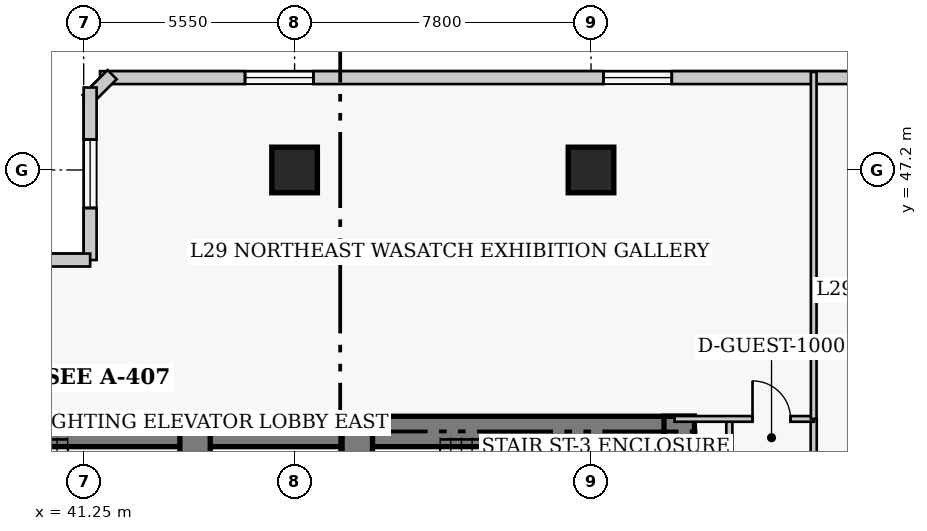
"""IFC4 building model, lengths in metres.
Left out: names, types, materials, properties, quantities, classifications, styles, units other than length and angle.
Written with IfcOpenShell. Run it as: python <this file> out.ifc"""

import sys

from ifc_helpers import new_model, si_unit, direction, frame, frame_2d, origin, origin_2d, place, context, subcontext, project, spatial, rectangle, extrude, element, fill, save


model = new_model("IFC4")
c1 = context("Model", 3, precision=1e-05, world=origin(), true_north=direction((0.0, 1.0)))
c2 = subcontext(c1, "Body", "Model", "MODEL_VIEW")
j1 = project(units=[si_unit("LENGTHUNIT", "METRE"), si_unit("PLANEANGLEUNIT", "RADIAN")], contexts=[c1])
p1 = place(None, origin())
s1 = spatial("IfcSite", under=j1, at=p1, CompositionType="ELEMENT")
p2 = place(p1, origin())
s2 = spatial("IfcBuilding", under=s1, at=p2, CompositionType="ELEMENT")
p3 = place(p2, frame((0.0, 0.0, 118.4)))
s3 = spatial("IfcBuildingStorey", under=s2, at=p3, CompositionType="ELEMENT", Elevation=118.4)
p4 = place(p3, frame((35.85, 40.32, 0.0), z_axis=(0.0, 0.0, 1.0), x_axis=(1.0, 0.0, 0.0)))
e1 = element("IfcWall", 1, at=p4, inside=s3, PredefinedType="SHEAR", context=c2, shape_type="SweptSolid", body=[
    extrude(rectangle(XDim=12.6, YDim=0.8, at=frame_2d((6.3, 0.0))), origin(), (0.0, 0.0, 1.0), 3.8),
])
p5 = place(p3, frame((48.45, 40.32, 0.0), z_axis=(0.0, 0.0, 1.0), x_axis=(1.0, 0.0, 0.0)))
e2 = element("IfcWall", 2, at=p5, inside=s3, PredefinedType="SHEAR", context=c2, shape_type="SweptSolid", body=[
    extrude(rectangle(XDim=8.87, YDim=0.8, at=frame_2d((4.435, 0.0))), origin(), (0.0, 0.0, 1.0), 3.8),
])
p6 = place(p3, frame((56.92, 27.05, 0.0), z_axis=(0.0, 0.0, 1.0), x_axis=(0.0, 1.0, 0.0)))
e3 = element("IfcWall", 3, at=p6, inside=s3, PredefinedType="SHEAR", context=c2, shape_type="SweptSolid", body=[
    extrude(rectangle(XDim=13.67, YDim=0.8, at=frame_2d((6.835, 0.0))), origin(), (0.0, 0.0, 1.0), 3.8),
])
p7 = place(p3, frame((44.18, 36.37, 0.0), z_axis=(0.0, 0.0, 1.0), x_axis=(0.0, 1.0, 0.0)))
e4 = element("IfcWall", 4, at=p7, inside=s3, PredefinedType="SHEAR", context=c2, shape_type="SweptSolid", body=[
    extrude(rectangle(XDim=3.95, YDim=0.8, at=frame_2d((1.975, 0.0))), origin(), (0.0, 0.0, 1.0), 3.8),
])
p8 = place(p3, frame((48.45, 32.35, 0.0), z_axis=(0.0, 0.0, 1.0), x_axis=(0.0, 1.0, 0.0)))
e5 = element("IfcWall", 5, at=p8, inside=s3, PredefinedType="SHEAR", context=c2, shape_type="SweptSolid", body=[
    extrude(rectangle(XDim=7.97, YDim=0.8, at=frame_2d((3.985, 0.0))), origin(), (0.0, 0.0, 1.0), 3.8),
])
p9 = place(p8, frame((5.85, 0.0, 0.0)))
e6 = element("IfcOpeningElement", 6, at=p9, cuts=e5, PredefinedType="OPENING", context=c2, shape_type="SweptSolid", body=[
    extrude(rectangle(XDim=1.1, YDim=2.15, at=frame_2d((0.55, 1.075))), frame((0.0, 0.41, 0.0), z_axis=(0.0, -1.0, 0.0), x_axis=(1.0, 0.0, 0.0)), (0.0, 0.0, 1.0), 0.82),
])
for number, where, z_axis, x_axis in (
    (7, (46.8, 47.2, 0.0), (0.0, 0.0, 1.0), (1.0, 0.0, 0.0)),
    (8, (54.6, 47.2, 0.0), (0.0, 0.0, 1.0), (1.0, 0.0, 0.0)),
):
    element("IfcColumn", number, at=place(p3, frame(where, z_axis=z_axis, x_axis=x_axis)), inside=s3, PredefinedType="COLUMN", context=c2, shape_type="SweptSolid", body=[
        extrude(rectangle(XDim=1.2, YDim=1.2, at=origin_2d()), origin(), (0.0, 0.0, 1.0), 3.8),
    ])
p10 = place(p3, frame((69.97, 49.63, 0.0), z_axis=(0.0, 0.0, 1.0), x_axis=(-1.0, 0.0, 0.0)))
e9 = element("IfcWall", 9, at=p10, inside=s3, PredefinedType="SOLIDWALL", context=c2, shape_type="SweptSolid", body=[
    extrude(rectangle(XDim=28.29, YDim=0.34, at=frame_2d((14.145, 0.0))), origin(), (0.0, 0.0, 1.0), 3.54),
])
p11 = place(p10, frame((3.815, 0.0, 0.85)))
e10 = element("IfcOpeningElement", 10, at=p11, cuts=e9, PredefinedType="OPENING", context=c2, shape_type="SweptSolid", body=[
    extrude(rectangle(XDim=1.8, YDim=1.8, at=frame_2d((0.9, 0.9))), frame((0.0, 0.18, 0.0), z_axis=(0.0, -1.0, 0.0), x_axis=(1.0, 0.0, 0.0)), (0.0, 0.0, 1.0), 0.36),
])
p12 = place(p10, frame((13.245, 0.0, 0.85)))
e11 = element("IfcOpeningElement", 11, at=p12, cuts=e9, PredefinedType="OPENING", context=c2, shape_type="SweptSolid", body=[
    extrude(rectangle(XDim=1.8, YDim=1.8, at=frame_2d((0.9, 0.9))), frame((0.0, 0.18, 0.0), z_axis=(0.0, -1.0, 0.0), x_axis=(1.0, 0.0, 0.0)), (0.0, 0.0, 1.0), 0.36),
])
p13 = place(p10, frame((22.675, 0.0, 0.85)))
e12 = element("IfcOpeningElement", 12, at=p13, cuts=e9, PredefinedType="OPENING", context=c2, shape_type="SweptSolid", body=[
    extrude(rectangle(XDim=1.8, YDim=1.8, at=frame_2d((0.9, 0.9))), frame((0.0, 0.18, 0.0), z_axis=(0.0, -1.0, 0.0), x_axis=(1.0, 0.0, 0.0)), (0.0, 0.0, 1.0), 0.36),
])
p14 = place(p3, frame((41.999, 49.708, 0.0), z_axis=(0.0, 0.0, 1.0), x_axis=(-0.707238225886, -0.706975312048, 0.0)))
e13 = element("IfcWall", 13, at=p14, inside=s3, PredefinedType="SOLIDWALL", context=c2, shape_type="SweptSolid", body=[
    extrude(rectangle(XDim=0.929, YDim=0.34, at=frame_2d((0.464, 0.0))), origin(), (0.0, 0.0, 1.0), 3.54),
])
p15 = place(p3, frame((41.42, 49.37, 0.0), z_axis=(0.0, 0.0, 1.0), x_axis=(0.0, -1.0, 0.0)))
e14 = element("IfcWall", 14, at=p15, inside=s3, PredefinedType="SOLIDWALL", context=c2, shape_type="SweptSolid", body=[
    extrude(rectangle(XDim=4.54, YDim=0.34, at=frame_2d((2.27, 0.0))), origin(), (0.0, 0.0, 1.0), 3.54),
])
p16 = place(p15, frame((1.37, 0.0, 0.85)))
e15 = element("IfcOpeningElement", 15, at=p16, cuts=e14, PredefinedType="OPENING", context=c2, shape_type="SweptSolid", body=[
    extrude(rectangle(XDim=1.8, YDim=1.8, at=frame_2d((0.9, 0.9))), frame((0.0, 0.18, 0.0), z_axis=(0.0, -1.0, 0.0), x_axis=(1.0, 0.0, 0.0)), (0.0, 0.0, 1.0), 0.36),
])
p17 = place(p3, frame((41.42, 44.83, 0.0), z_axis=(0.0, 0.0, 1.0), x_axis=(-1.0, 0.0, 0.0)))
e16 = element("IfcWall", 16, at=p17, inside=s3, PredefinedType="SOLIDWALL", context=c2, shape_type="SweptSolid", body=[
    extrude(rectangle(XDim=4.84, YDim=0.34, at=frame_2d((2.42, 0.0))), origin(), (0.0, 0.0, 1.0), 3.54),
])
p18 = place(p17, frame((1.52, 0.0, 0.85)))
e17 = element("IfcOpeningElement", 17, at=p18, cuts=e16, PredefinedType="OPENING", context=c2, shape_type="SweptSolid", body=[
    extrude(rectangle(XDim=1.8, YDim=1.8, at=frame_2d((0.9, 0.9))), frame((0.0, 0.18, 0.0), z_axis=(0.0, -1.0, 0.0), x_axis=(1.0, 0.0, 0.0)), (0.0, 0.0, 1.0), 0.36),
])
p19 = place(p3, frame((60.46, 11.85, 0.0), z_axis=(0.0, 0.0, 1.0), x_axis=(0.0, 1.0, 0.0)))
e18 = element("IfcWall", 18, at=p19, inside=s3, PredefinedType="PARTITIONING", context=c2, shape_type="SweptSolid", body=[
    extrude(rectangle(XDim=28.8, YDim=0.16, at=frame_2d((14.4, 0.0))), origin(), (0.0, 0.0, 1.0), 3.54),
])
p20 = place(p19, frame((3.6, 0.0, 0.0)))
e19 = element("IfcOpeningElement", 19, at=p20, cuts=e18, PredefinedType="OPENING", context=c2, shape_type="SweptSolid", body=[
    extrude(rectangle(XDim=0.95, YDim=2.1, at=frame_2d((0.475, 1.05))), frame((0.0, 0.09, 0.0), z_axis=(0.0, -1.0, 0.0), x_axis=(1.0, 0.0, 0.0)), (0.0, 0.0, 1.0), 0.18),
])
p21 = place(p19, frame((12.075, 0.0, 0.0)))
e20 = element("IfcOpeningElement", 20, at=p21, cuts=e18, PredefinedType="OPENING", context=c2, shape_type="SweptSolid", body=[
    extrude(rectangle(XDim=0.95, YDim=2.1, at=frame_2d((0.475, 1.05))), frame((0.0, 0.09, 0.0), z_axis=(0.0, -1.0, 0.0), x_axis=(1.0, 0.0, 0.0)), (0.0, 0.0, 1.0), 0.18),
])
p22 = place(p19, frame((19.875, 0.0, 0.0)))
e21 = element("IfcOpeningElement", 21, at=p22, cuts=e18, PredefinedType="OPENING", context=c2, shape_type="SweptSolid", body=[
    extrude(rectangle(XDim=0.95, YDim=2.1, at=frame_2d((0.475, 1.05))), frame((0.0, 0.09, 0.0), z_axis=(0.0, -1.0, 0.0), x_axis=(1.0, 0.0, 0.0)), (0.0, 0.0, 1.0), 0.18),
])
p23 = place(p19, frame((24.3, 0.0, 0.0)))
e22 = element("IfcOpeningElement", 22, at=p23, cuts=e18, PredefinedType="OPENING", context=c2, shape_type="SweptSolid", body=[
    extrude(rectangle(XDim=1.0, YDim=2.15, at=frame_2d((0.5, 1.075))), frame((0.0, 0.09, 0.0), z_axis=(0.0, -1.0, 0.0), x_axis=(1.0, 0.0, 0.0)), (0.0, 0.0, 1.0), 0.18),
])
p24 = place(p3, frame((58.24, 26.36, 0.0), z_axis=(0.0, 0.0, 1.0), x_axis=(0.0, 1.0, 0.0)))
e23 = element("IfcWall", 23, at=p24, inside=s3, PredefinedType="PARTITIONING", context=c2, shape_type="SweptSolid", body=[
    extrude(rectangle(XDim=14.29, YDim=0.16, at=frame_2d((7.145, 0.0))), origin(), (0.0, 0.0, 1.0), 3.54),
])
p25 = place(p3, frame((56.8, 40.65, 0.0), z_axis=(0.0, 0.0, 1.0), x_axis=(1.0, 0.0, 0.0)))
e24 = element("IfcWall", 24, at=p25, inside=s3, PredefinedType="PARTITIONING", context=c2, shape_type="SweptSolid", body=[
    extrude(rectangle(XDim=3.66, YDim=0.15, at=frame_2d((1.83, 0.0))), origin(), (0.0, 0.0, 1.0), 3.54),
])
p26 = place(p25, frame((2.05, 0.0, 0.0)))
e25 = element("IfcOpeningElement", 25, at=p26, cuts=e24, PredefinedType="OPENING", context=c2, shape_type="SweptSolid", body=[
    extrude(rectangle(XDim=1.0, YDim=2.15, at=frame_2d((0.5, 1.075))), frame((0.0, 0.085, 0.0), z_axis=(0.0, -1.0, 0.0), x_axis=(1.0, 0.0, 0.0)), (0.0, 0.0, 1.0), 0.17),
])
p27 = place(p3, frame((60.46, 40.65, 0.0), z_axis=(0.0, 0.0, 1.0), x_axis=(0.0, 1.0, 0.0)))
e26 = element("IfcWall", 26, at=p27, inside=s3, PredefinedType="PARTITIONING", context=c2, shape_type="SweptSolid", body=[
    extrude(rectangle(XDim=9.13, YDim=0.15, at=frame_2d((4.565, 0.0))), origin(), (0.0, 0.0, 1.0), 3.54),
])
p28 = place(p12, origin())
e27 = element("IfcWindow", 27, at=p28, inside=s3, PartitioningType="SINGLE_PANEL", PredefinedType="WINDOW", context=c2, shape_type="SweptSolid", body=[
    extrude(rectangle(XDim=1.8, YDim=1.8, at=frame_2d((0.9, 0.9))), frame((0.0, 0.03, 0.0), z_axis=(0.0, -1.0, 0.0), x_axis=(1.0, 0.0, 0.0)), (0.0, 0.0, 1.0), 0.06),
])
fill(e11, e27)
p29 = place(p13, origin())
e28 = element("IfcWindow", 28, at=p29, inside=s3, PartitioningType="SINGLE_PANEL", PredefinedType="WINDOW", context=c2, shape_type="SweptSolid", body=[
    extrude(rectangle(XDim=1.8, YDim=1.8, at=frame_2d((0.9, 0.9))), frame((0.0, 0.03, 0.0), z_axis=(0.0, -1.0, 0.0), x_axis=(1.0, 0.0, 0.0)), (0.0, 0.0, 1.0), 0.06),
])
fill(e12, e28)
p30 = place(p16, origin())
e29 = element("IfcWindow", 29, at=p30, inside=s3, PartitioningType="SINGLE_PANEL", PredefinedType="WINDOW", context=c2, shape_type="SweptSolid", body=[
    extrude(rectangle(XDim=1.8, YDim=1.8, at=frame_2d((0.9, 0.9))), frame((0.0, 0.03, 0.0), z_axis=(0.0, -1.0, 0.0), x_axis=(1.0, 0.0, 0.0)), (0.0, 0.0, 1.0), 0.06),
])
fill(e15, e29)
p31 = place(p26, origin())
e30 = element("IfcDoor", 30, at=p31, inside=s3, OperationType="SINGLE_SWING_LEFT", PredefinedType="DOOR", context=c2, shape_type="SweptSolid", body=[
    extrude(rectangle(XDim=1.0, YDim=2.15, at=frame_2d((0.5, 1.075))), frame((0.0, 0.025, 0.0), z_axis=(0.0, -1.0, 0.0), x_axis=(1.0, 0.0, 0.0)), (0.0, 0.0, 1.0), 0.05),
])
fill(e25, e30)
save(model, sys.argv[1])
